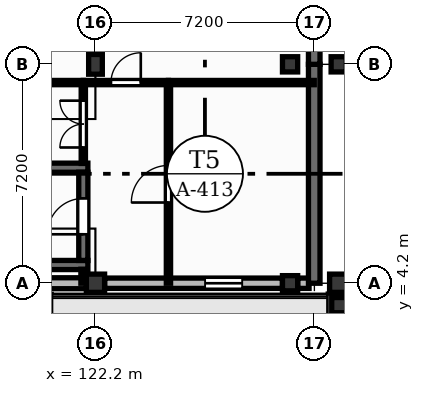
"""IFC4 building model, lengths in metres.
Left out: names, types, materials, properties, quantities, classifications, styles, units other than length and angle.
Written with IfcOpenShell. Run it as: python <this file> out.ifc"""

import sys

from ifc_helpers import new_model, si_unit, direction, frame, frame_2d, origin, origin_2d, place, context, subcontext, project, spatial, rectangle, extrude, element, fill, save


model = new_model("IFC4")
c1 = context("Model", 3, precision=1e-05, world=origin(), true_north=direction((0.0, 1.0)))
c2 = subcontext(c1, "Body", "Model", "MODEL_VIEW")
j1 = project(units=[si_unit("LENGTHUNIT", "METRE"), si_unit("PLANEANGLEUNIT", "RADIAN")], contexts=[c1])
p1 = place(None, origin())
s1 = spatial("IfcSite", under=j1, at=p1, CompositionType="ELEMENT")
p2 = place(p1, origin())
s2 = spatial("IfcBuilding", under=s1, at=p2, CompositionType="ELEMENT")
p3 = place(p2, origin())
s3 = spatial("IfcBuildingStorey", under=s2, at=p3, CompositionType="ELEMENT", Elevation=0.0)
p4 = place(p3, frame((122.2, 4.2, 0.0), z_axis=(0.0, 0.0, 1.0), x_axis=(1.0, 0.0, 0.0)))
e1 = element("IfcColumn", 1, at=p4, inside=s3, PredefinedType="COLUMN", context=c2, shape_type="SweptSolid", body=[
    extrude(rectangle(XDim=0.6, YDim=0.6, at=origin_2d()), origin(), (0.0, 0.0, 1.0), 4.2),
])
p5 = place(p3, frame((122.2, 11.4, 0.0), z_axis=(0.0, 0.0, 1.0), x_axis=(1.0, 0.0, 0.0)))
e2 = element("IfcColumn", 2, at=p5, inside=s3, PredefinedType="COLUMN", context=c2, shape_type="SweptSolid", body=[
    extrude(rectangle(XDim=0.45, YDim=0.65, at=origin_2d()), origin(), (0.0, 0.0, 1.0), 4.2),
])
for number, where, z_axis, x_axis in (
    (3, (128.6, 4.2, 0.0), (0.0, 0.0, 1.0), (1.0, 0.0, 0.0)),
    (4, (128.6, 11.4, 0.0), (0.0, 0.0, 1.0), (1.0, 0.0, 0.0)),
):
    element("IfcColumn", number, at=place(p3, frame(where, z_axis=z_axis, x_axis=x_axis)), inside=s3, PredefinedType="COLUMN", context=c2, shape_type="SweptSolid", body=[
        extrude(rectangle(XDim=0.5, YDim=0.5, at=origin_2d()), origin(), (0.0, 0.0, 1.0), 4.2),
    ])
p6 = place(p3, frame((130.2, 4.2, -0.4), z_axis=(0.0, 0.0, 1.0), x_axis=(1.0, 0.0, 0.0)))
e5 = element("IfcColumn", 5, at=p6, inside=s3, PredefinedType="COLUMN", context=c2, shape_type="SweptSolid", body=[
    extrude(rectangle(XDim=0.6, YDim=0.6, at=origin_2d()), origin(), (0.0, 0.0, 1.0), 4.5),
])
p7 = place(p3, frame((130.2, 11.4, -0.4), z_axis=(0.0, 0.0, 1.0), x_axis=(1.0, 0.0, 0.0)))
e6 = element("IfcColumn", 6, at=p7, inside=s3, PredefinedType="COLUMN", context=c2, shape_type="SweptSolid", body=[
    extrude(rectangle(XDim=0.5, YDim=0.5, at=origin_2d()), origin(), (0.0, 0.0, 1.0), 4.5),
])
p8 = place(p3, frame((130.22, 3.48, -1.6), z_axis=(0.0, 0.0, 1.0), x_axis=(1.0, 0.0, 0.0)))
e7 = element("IfcColumn", 7, at=p8, inside=s3, PredefinedType="COLUMN", context=c2, shape_type="SweptSolid", body=[
    extrude(rectangle(XDim=0.5, YDim=0.5, at=origin_2d()), origin(), (0.0, 0.0, 1.0), 2.1),
])
p9 = place(p3, frame((115.25, 4.2, 0.0), z_axis=(0.0, 0.0, 1.0), x_axis=(1.0, 0.0, 0.0)))
e8 = element("IfcWall", 8, at=p9, inside=s3, PredefinedType="SOLIDWALL", context=c2, shape_type="SweptSolid", body=[
    extrude(rectangle(XDim=6.65, YDim=0.36, at=frame_2d((3.325, 0.0))), origin(), (0.0, 0.0, 1.0), 3.68),
])
p10 = place(p3, frame((122.5, 4.2, 0.0), z_axis=(0.0, 0.0, 1.0), x_axis=(1.0, 0.0, 0.0)))
e9 = element("IfcWall", 9, at=p10, inside=s3, PredefinedType="SOLIDWALL", context=c2, shape_type="SweptSolid", body=[
    extrude(rectangle(XDim=5.85, YDim=0.34, at=frame_2d((2.925, 0.0))), origin(), (0.0, 0.0, 1.0), 3.68),
])
p11 = place(p10, frame((3.305, 0.0, 1.0)))
e10 = element("IfcOpeningElement", 10, at=p11, cuts=e9, PredefinedType="OPENING", context=c2, shape_type="SweptSolid", body=[
    extrude(rectangle(XDim=1.22, YDim=2.2, at=frame_2d((0.61, 1.1))), frame((0.0, 0.18, 0.0), z_axis=(0.0, -1.0, 0.0), x_axis=(1.0, 0.0, 0.0)), (0.0, 0.0, 1.0), 0.36),
])
p12 = place(p3, frame((128.85, 4.2, 0.0), z_axis=(0.0, 0.0, 1.0), x_axis=(1.0, 0.0, 0.0)))
e11 = element("IfcWall", 11, at=p12, inside=s3, PredefinedType="SOLIDWALL", context=c2, shape_type="SweptSolid", body=[
    extrude(rectangle(XDim=0.375, YDim=0.34, at=frame_2d((0.188, 0.0))), origin(), (0.0, 0.0, 1.0), 4.2),
])
p13 = place(p3, frame((129.395, 4.2, 0.0), z_axis=(0.0, 0.0, 1.0), x_axis=(0.0, 1.0, 0.0)))
e12 = element("IfcWall", 12, at=p13, inside=s3, PredefinedType="USERDEFINED", context=c2, shape_type="SweptSolid", body=[
    extrude(rectangle(XDim=7.2, YDim=0.38, at=frame_2d((3.6, 0.0))), origin(), (0.0, 0.0, 1.0), 4.2),
])
p14 = place(p3, frame((129.395, 11.4, 0.0), z_axis=(0.0, 0.0, 1.0), x_axis=(0.0, 1.0, 0.0)))
e13 = element("IfcWall", 13, at=p14, inside=s3, PredefinedType="USERDEFINED", context=c2, shape_type="SweptSolid", body=[
    extrude(rectangle(XDim=7.2, YDim=0.38, at=frame_2d((3.6, 0.0))), origin(), (0.0, 0.0, 1.0), 4.2),
])
for number, where, z_axis, x_axis in (
    (14, (115.25, 4.8, 0.0), (0.0, 0.0, 1.0), (1.0, 0.0, 0.0)),
    (15, (115.25, 8.0, 0.0), (0.0, 0.0, 1.0), (1.0, 0.0, 0.0)),
):
    element("IfcWall", number, at=place(p3, frame(where, z_axis=z_axis, x_axis=x_axis)), inside=s3, PredefinedType="SHEAR", context=c2, shape_type="SweptSolid", body=[
        extrude(rectangle(XDim=6.7, YDim=0.3, at=frame_2d((3.35, 0.0))), origin(), (0.0, 0.0, 1.0), 4.25),
    ])
p15 = place(p3, frame((121.8, 4.95, 0.0), z_axis=(0.0, 0.0, 1.0), x_axis=(0.0, 1.0, 0.0)))
e16 = element("IfcWall", 16, at=p15, inside=s3, PredefinedType="SHEAR", context=c2, shape_type="SweptSolid", body=[
    extrude(rectangle(XDim=2.9, YDim=0.3, at=frame_2d((1.45, 0.0))), origin(), (0.0, 0.0, 1.0), 4.25),
])
p16 = place(p15, frame((0.86, 0.0, 0.0)))
e17 = element("IfcOpeningElement", 17, at=p16, cuts=e16, PredefinedType="OPENING", context=c2, shape_type="SweptSolid", body=[
    extrude(rectangle(XDim=1.18, YDim=2.15, at=frame_2d((0.59, 1.075))), frame((0.0, 0.16, 0.0), z_axis=(0.0, -1.0, 0.0), x_axis=(1.0, 0.0, 0.0)), (0.0, 0.0, 1.0), 0.32),
])
p17 = place(p3, frame((115.0, 10.8, 0.0), z_axis=(0.0, 0.0, 1.0), x_axis=(1.0, 0.0, 0.0)))
e18 = element("IfcWall", 18, at=p17, inside=s3, PredefinedType="PARTITIONING", context=c2, shape_type="SweptSolid", body=[
    extrude(rectangle(XDim=6.8, YDim=0.14, at=frame_2d((3.4, 0.0))), origin(), (0.0, 0.0, 1.0), 4.18),
])
p18 = place(p17, frame((2.91, 0.0, 0.0)))
e19 = element("IfcOpeningElement", 19, at=p18, cuts=e18, PredefinedType="OPENING", context=c2, shape_type="SweptSolid", body=[
    extrude(rectangle(XDim=0.98, YDim=2.15, at=frame_2d((0.49, 1.075))), frame((0.0, 0.08, 0.0), z_axis=(0.0, -1.0, 0.0), x_axis=(1.0, 0.0, 0.0)), (0.0, 0.0, 1.0), 0.16),
])
p19 = place(p3, frame((121.8, 8.14, 0.0), z_axis=(0.0, 0.0, 1.0), x_axis=(0.0, 1.0, 0.0)))
e20 = element("IfcWall", 20, at=p19, inside=s3, PredefinedType="PARTITIONING", context=c2, shape_type="SweptSolid", body=[
    extrude(rectangle(XDim=2.59, YDim=0.14, at=frame_2d((1.295, 0.0))), origin(), (0.0, 0.0, 1.0), 4.18),
])
p20 = place(p19, frame((0.525, 0.0, 0.0)))
e21 = element("IfcOpeningElement", 21, at=p20, cuts=e20, PredefinedType="OPENING", context=c2, shape_type="SweptSolid", body=[
    extrude(rectangle(XDim=1.54, YDim=2.25, at=frame_2d((0.77, 1.125))), frame((0.0, 0.08, 0.0), z_axis=(0.0, -1.0, 0.0), x_axis=(1.0, 0.0, 0.0)), (0.0, 0.0, 1.0), 0.16),
])
p21 = place(p3, frame((121.8, 10.8, 0.0), z_axis=(0.0, 0.0, 1.0), x_axis=(1.0, 0.0, 0.0)))
e22 = element("IfcWall", 22, at=p21, inside=s3, PredefinedType="PARTITIONING", context=c2, shape_type="SweptSolid", body=[
    extrude(rectangle(XDim=2.8, YDim=0.14, at=frame_2d((1.4, 0.0))), origin(), (0.0, 0.0, 1.0), 4.18),
])
p22 = place(p21, frame((0.91, 0.0, 0.0)))
e23 = element("IfcOpeningElement", 23, at=p22, cuts=e22, PredefinedType="OPENING", context=c2, shape_type="SweptSolid", body=[
    extrude(rectangle(XDim=0.98, YDim=2.15, at=frame_2d((0.49, 1.075))), frame((0.0, 0.08, 0.0), z_axis=(0.0, -1.0, 0.0), x_axis=(1.0, 0.0, 0.0)), (0.0, 0.0, 1.0), 0.16),
])
p23 = place(p3, frame((124.6, 4.2, 0.0), z_axis=(0.0, 0.0, 1.0), x_axis=(0.0, 1.0, 0.0)))
e24 = element("IfcWall", 24, at=p23, inside=s3, PredefinedType="PARTITIONING", context=c2, shape_type="SweptSolid", body=[
    extrude(rectangle(XDim=6.53, YDim=0.14, at=frame_2d((3.265, 0.0))), origin(), (0.0, 0.0, 1.0), 4.18),
])
p24 = place(p23, frame((2.655, 0.0, 0.0)))
e25 = element("IfcOpeningElement", 25, at=p24, cuts=e24, PredefinedType="OPENING", context=c2, shape_type="SweptSolid", body=[
    extrude(rectangle(XDim=1.22, YDim=2.1, at=frame_2d((0.61, 1.05))), frame((0.0, 0.08, 0.0), z_axis=(0.0, -1.0, 0.0), x_axis=(1.0, 0.0, 0.0)), (0.0, 0.0, 1.0), 0.16),
])
p25 = place(p3, frame((124.6, 10.8, 0.0), z_axis=(0.0, 0.0, 1.0), x_axis=(1.0, 0.0, 0.0)))
e26 = element("IfcWall", 26, at=p25, inside=s3, PredefinedType="PARTITIONING", context=c2, shape_type="SweptSolid", body=[
    extrude(rectangle(XDim=4.795, YDim=0.14, at=frame_2d((2.397, 0.0))), origin(), (0.0, 0.0, 1.0), 4.18),
])
p26 = place(p3, frame((121.8, 4.2, 0.0), z_axis=(0.0, 0.0, 1.0), x_axis=(0.0, 1.0, 0.0)))
e27 = element("IfcWall", 27, at=p26, inside=s3, PredefinedType="PARTITIONING", context=c2, shape_type="SweptSolid", body=[
    extrude(rectangle(XDim=0.46, YDim=0.16, at=frame_2d((0.23, 0.0))), origin(), (0.0, 0.0, 1.0), 4.18),
])
p27 = place(p11, origin())
e28 = element("IfcWindow", 28, at=p27, inside=s3, PartitioningType="SINGLE_PANEL", PredefinedType="WINDOW", context=c2, shape_type="SweptSolid", body=[
    extrude(rectangle(XDim=1.22, YDim=2.2, at=frame_2d((0.61, 1.1))), frame((0.0, 0.03, 0.0), z_axis=(0.0, -1.0, 0.0), x_axis=(1.0, 0.0, 0.0)), (0.0, 0.0, 1.0), 0.06),
])
fill(e10, e28)
p28 = place(p16, origin())
e29 = element("IfcDoor", 29, at=p28, inside=s3, OperationType="SINGLE_SWING_LEFT", PredefinedType="DOOR", context=c2, shape_type="SweptSolid", body=[
    extrude(rectangle(XDim=1.18, YDim=2.15, at=frame_2d((0.59, 1.075))), frame((0.0, 0.025, 0.0), z_axis=(0.0, -1.0, 0.0), x_axis=(1.0, 0.0, 0.0)), (0.0, 0.0, 1.0), 0.05),
])
fill(e17, e29)
p29 = place(p22, origin())
e30 = element("IfcDoor", 30, at=p29, inside=s3, OperationType="SINGLE_SWING_RIGHT", PredefinedType="DOOR", context=c2, shape_type="SweptSolid", body=[
    extrude(rectangle(XDim=0.98, YDim=2.15, at=frame_2d((0.49, 1.075))), frame((0.0, 0.025, 0.0), z_axis=(0.0, -1.0, 0.0), x_axis=(1.0, 0.0, 0.0)), (0.0, 0.0, 1.0), 0.05),
])
fill(e23, e30)
p30 = place(p20, origin())
e31 = element("IfcDoor", 31, at=p30, inside=s3, OperationType="DOUBLE_DOOR_SINGLE_SWING", PredefinedType="DOOR", context=c2, shape_type="SweptSolid", body=[
    extrude(rectangle(XDim=1.54, YDim=2.25, at=frame_2d((0.77, 1.125))), frame((0.0, 0.025, 0.0), z_axis=(0.0, -1.0, 0.0), x_axis=(1.0, 0.0, 0.0)), (0.0, 0.0, 1.0), 0.05),
])
fill(e21, e31)
p31 = place(p24, origin())
e32 = element("IfcDoor", 32, at=p31, inside=s3, OperationType="SINGLE_SWING_LEFT", PredefinedType="DOOR", context=c2, shape_type="SweptSolid", body=[
    extrude(rectangle(XDim=1.22, YDim=2.1, at=frame_2d((0.61, 1.05))), frame((0.0, 0.025, 0.0), z_axis=(0.0, -1.0, 0.0), x_axis=(1.0, 0.0, 0.0)), (0.0, 0.0, 1.0), 0.05),
])
fill(e25, e32)
save(model, sys.argv[1])
